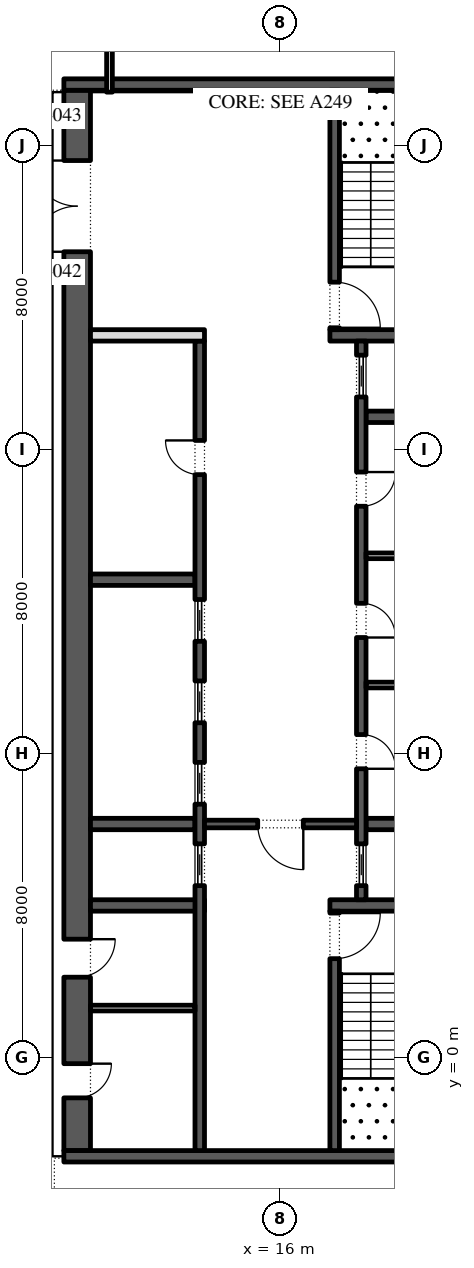
"""IFC4 building model, lengths in metres.
Left out: names, types, materials, properties, quantities, classifications, styles, units other than length and angle.
Written with IfcOpenShell. Run it as: python <this file> out.ifc"""

import sys

from ifc_helpers import new_model, si_unit, direction, frame, frame_2d, origin, place, context, subcontext, project, spatial, rectangle, extrude, element, fill, save


model = new_model("IFC4")
c1 = context("Model", 3, precision=1e-05, world=origin(), true_north=direction((0.0, 1.0)))
c2 = subcontext(c1, "Body", "Model", "MODEL_VIEW")
j1 = project(units=[si_unit("LENGTHUNIT", "METRE"), si_unit("PLANEANGLEUNIT", "RADIAN")], contexts=[c1])
p1 = place(None, origin())
s1 = spatial("IfcSite", under=j1, at=p1, CompositionType="ELEMENT")
p2 = place(p1, origin())
s2 = spatial("IfcBuilding", under=s1, at=p2, CompositionType="ELEMENT")
p3 = place(p2, frame((0.0, 0.0, 209.4)))
s3 = spatial("IfcBuildingStorey", under=s2, at=p3, CompositionType="ELEMENT", Elevation=209.4)
p4 = place(p3, frame((10.65, -2.45, 0.0), z_axis=(0.0, 0.0, 1.0), x_axis=(0.0, 1.0, 0.0)))
e1 = element("IfcWall", 1, at=p4, inside=s3, PredefinedType="SHEAR", context=c2, shape_type="SweptSolid", body=[
    extrude(rectangle(XDim=27.9, YDim=0.7, at=frame_2d((13.95, 0.0))), origin(), (0.0, 0.0, 1.0), 4.0),
])
p5 = place(p4, frame((23.65, 0.0, 0.0)))
e2 = element("IfcOpeningElement", 2, at=p5, cuts=e1, PredefinedType="OPENING", context=c2, shape_type="SweptSolid", body=[
    extrude(rectangle(XDim=2.4, YDim=2.1, at=frame_2d((1.2, 1.05))), frame((0.0, 0.36, 0.0), z_axis=(0.0, -1.0, 0.0), x_axis=(1.0, 0.0, 0.0)), (0.0, 0.0, 1.0), 0.72),
])
p6 = place(p4, frame((1.387, 0.0, 0.0)))
e3 = element("IfcOpeningElement", 3, at=p6, cuts=e1, PredefinedType="OPENING", context=c2, shape_type="SweptSolid", body=[
    extrude(rectangle(XDim=0.9, YDim=2.1, at=frame_2d((0.45, 1.05))), frame((0.0, 0.36, 0.0), z_axis=(0.0, -1.0, 0.0), x_axis=(1.0, 0.0, 0.0)), (0.0, 0.0, 1.0), 0.72),
])
p7 = place(p4, frame((4.562, 0.0, 0.0)))
e4 = element("IfcOpeningElement", 4, at=p7, cuts=e1, PredefinedType="OPENING", context=c2, shape_type="SweptSolid", body=[
    extrude(rectangle(XDim=1.0, YDim=2.1, at=frame_2d((0.5, 1.05))), frame((0.0, 0.36, 0.0), z_axis=(0.0, -1.0, 0.0), x_axis=(1.0, 0.0, 0.0)), (0.0, 0.0, 1.0), 0.72),
])
for number, where, z_axis, x_axis in (
    (5, (10.3, -2.6, 0.0), (0.0, 0.0, 1.0), (1.0, 0.0, 0.0)),
    (6, (10.3, 25.6, 0.0), (0.0, 0.0, 1.0), (1.0, 0.0, 0.0)),
):
    element("IfcWall", number, at=place(p3, frame(where, z_axis=z_axis, x_axis=x_axis)), inside=s3, PredefinedType="SHEAR", context=c2, shape_type="SweptSolid", body=[
        extrude(rectangle(XDim=11.4, YDim=0.3, at=frame_2d((5.7, 0.0))), origin(), (0.0, 0.0, 1.0), 4.0),
    ])
p8 = place(p3, frame((17.3, 4.0, 0.0), z_axis=(0.0, 0.0, 1.0), x_axis=(1.0, 0.0, 0.0)))
e7 = element("IfcWall", 7, at=p8, inside=s3, PredefinedType="SHEAR", context=c2, shape_type="SweptSolid", body=[
    extrude(rectangle(XDim=3.7, YDim=0.3, at=frame_2d((1.85, 0.0))), origin(), (0.0, 0.0, 1.0), 4.0),
])
p9 = place(p3, frame((17.425, -2.45, 0.0), z_axis=(0.0, 0.0, 1.0), x_axis=(0.0, 1.0, 0.0)))
e8 = element("IfcWall", 8, at=p9, inside=s3, PredefinedType="SHEAR", context=c2, shape_type="SweptSolid", body=[
    extrude(rectangle(XDim=6.3, YDim=0.25, at=frame_2d((3.15, 0.0))), origin(), (0.0, 0.0, 1.0), 4.0),
])
p10 = place(p9, frame((5.05, 0.0, 0.0)))
e9 = element("IfcOpeningElement", 9, at=p10, cuts=e8, PredefinedType="OPENING", context=c2, shape_type="SweptSolid", body=[
    extrude(rectangle(XDim=1.2, YDim=2.1, at=frame_2d((0.6, 1.05))), frame((0.0, 0.135, 0.0), z_axis=(0.0, -1.0, 0.0), x_axis=(1.0, 0.0, 0.0)), (0.0, 0.0, 1.0), 0.27),
])
p11 = place(p3, frame((17.3, 19.0, 0.0), z_axis=(0.0, 0.0, 1.0), x_axis=(1.0, 0.0, 0.0)))
e10 = element("IfcWall", 10, at=p11, inside=s3, PredefinedType="SHEAR", context=c2, shape_type="SweptSolid", body=[
    extrude(rectangle(XDim=3.7, YDim=0.3, at=frame_2d((1.85, 0.0))), origin(), (0.0, 0.0, 1.0), 4.0),
])
p12 = place(p3, frame((17.425, 19.15, 0.0), z_axis=(0.0, 0.0, 1.0), x_axis=(0.0, 1.0, 0.0)))
e11 = element("IfcWall", 11, at=p12, inside=s3, PredefinedType="SHEAR", context=c2, shape_type="SweptSolid", body=[
    extrude(rectangle(XDim=6.3, YDim=0.25, at=frame_2d((3.15, 0.0))), origin(), (0.0, 0.0, 1.0), 4.0),
])
p13 = place(p12, frame((0.05, 0.0, 0.0)))
e12 = element("IfcOpeningElement", 12, at=p13, cuts=e11, PredefinedType="OPENING", context=c2, shape_type="SweptSolid", body=[
    extrude(rectangle(XDim=1.2, YDim=2.1, at=frame_2d((0.6, 1.05))), frame((0.0, 0.135, 0.0), z_axis=(0.0, -1.0, 0.0), x_axis=(1.0, 0.0, 0.0)), (0.0, 0.0, 1.0), 0.27),
])
for number, where, z_axis, x_axis in (
    (13, (18.25, 6.143, 0.0), (0.0, 0.0, 1.0), (1.0, 0.0, 0.0)),
    (14, (18.25, 16.857, 0.0), (0.0, 0.0, 1.0), (1.0, 0.0, 0.0)),
):
    element("IfcWall", number, at=place(p3, frame(where, z_axis=z_axis, x_axis=x_axis)), inside=s3, PredefinedType="SHEAR", context=c2, shape_type="SweptSolid", body=[
        extrude(rectangle(XDim=2.75, YDim=0.3, at=frame_2d((1.375, 0.0))), origin(), (0.0, 0.0, 1.0), 4.0),
    ])
p14 = place(p3, frame((18.125, 4.15, 0.0), z_axis=(0.0, 0.0, 1.0), x_axis=(0.0, 1.0, 0.0)))
e15 = element("IfcWall", 15, at=p14, inside=s3, PredefinedType="SHEAR", context=c2, shape_type="SweptSolid", body=[
    extrude(rectangle(XDim=14.7, YDim=0.25, at=frame_2d((7.35, 0.0))), origin(), (0.0, 0.0, 1.0), 4.0),
])
p15 = place(p14, frame((3.446, 0.0, 0.0)))
e16 = element("IfcOpeningElement", 16, at=p15, cuts=e15, PredefinedType="OPENING", context=c2, shape_type="SweptSolid", body=[
    extrude(rectangle(XDim=0.9, YDim=2.1, at=frame_2d((0.45, 1.05))), frame((0.0, 0.135, 0.0), z_axis=(0.0, -1.0, 0.0), x_axis=(1.0, 0.0, 0.0)), (0.0, 0.0, 1.0), 0.27),
])
p16 = place(p14, frame((6.9, 0.0, 0.0)))
e17 = element("IfcOpeningElement", 17, at=p16, cuts=e15, PredefinedType="OPENING", context=c2, shape_type="SweptSolid", body=[
    extrude(rectangle(XDim=0.9, YDim=2.1, at=frame_2d((0.45, 1.05))), frame((0.0, 0.135, 0.0), z_axis=(0.0, -1.0, 0.0), x_axis=(1.0, 0.0, 0.0)), (0.0, 0.0, 1.0), 0.27),
])
p17 = place(p14, frame((10.354, 0.0, 0.0)))
e18 = element("IfcOpeningElement", 18, at=p17, cuts=e15, PredefinedType="OPENING", context=c2, shape_type="SweptSolid", body=[
    extrude(rectangle(XDim=0.9, YDim=2.1, at=frame_2d((0.45, 1.05))), frame((0.0, 0.135, 0.0), z_axis=(0.0, -1.0, 0.0), x_axis=(1.0, 0.0, 0.0)), (0.0, 0.0, 1.0), 0.27),
])
p18 = place(p14, frame((0.371, 0.0, 0.0)))
e19 = element("IfcOpeningElement", 19, at=p18, cuts=e15, PredefinedType="OPENING", context=c2, shape_type="SweptSolid", body=[
    extrude(rectangle(XDim=1.1, YDim=2.1, at=frame_2d((0.55, 1.05))), frame((0.0, 0.135, 0.0), z_axis=(0.0, -1.0, 0.0), x_axis=(1.0, 0.0, 0.0)), (0.0, 0.0, 1.0), 0.27),
])
p19 = place(p14, frame((13.229, 0.0, 0.0)))
e20 = element("IfcOpeningElement", 20, at=p19, cuts=e15, PredefinedType="OPENING", context=c2, shape_type="SweptSolid", body=[
    extrude(rectangle(XDim=1.1, YDim=2.1, at=frame_2d((0.55, 1.05))), frame((0.0, 0.135, 0.0), z_axis=(0.0, -1.0, 0.0), x_axis=(1.0, 0.0, 0.0)), (0.0, 0.0, 1.0), 0.27),
])
for number, where, z_axis, x_axis in (
    (21, (18.25, 9.8, 0.0), (0.0, 0.0, 1.0), (1.0, 0.0, 0.0)),
    (22, (18.25, 13.2, 0.0), (0.0, 0.0, 1.0), (1.0, 0.0, 0.0)),
):
    element("IfcWall", number, at=place(p3, frame(where, z_axis=z_axis, x_axis=x_axis)), inside=s3, PredefinedType="PARTITIONING", context=c2, shape_type="SweptSolid", body=[
        extrude(rectangle(XDim=2.75, YDim=0.15, at=frame_2d((1.375, 0.0))), origin(), (0.0, 0.0, 1.0), 4.0),
    ])
p20 = place(p3, frame((11.0, 4.0, 0.0), z_axis=(0.0, 0.0, 1.0), x_axis=(1.0, 0.0, 0.0)))
e23 = element("IfcWall", 23, at=p20, inside=s3, PredefinedType="SHEAR", context=c2, shape_type="SweptSolid", body=[
    extrude(rectangle(XDim=3.0, YDim=0.3, at=frame_2d((1.5, 0.0))), origin(), (0.0, 0.0, 1.0), 4.0),
])
for number, where, z_axis, x_axis in (
    (24, (11.0, 6.143, 0.0), (0.0, 0.0, 1.0), (1.0, 0.0, 0.0)),
    (25, (11.0, 12.571, 0.0), (0.0, 0.0, 1.0), (1.0, 0.0, 0.0)),
):
    element("IfcWall", number, at=place(p3, frame(where, z_axis=z_axis, x_axis=x_axis)), inside=s3, PredefinedType="SHEAR", context=c2, shape_type="SweptSolid", body=[
        extrude(rectangle(XDim=2.75, YDim=0.3, at=frame_2d((1.375, 0.0))), origin(), (0.0, 0.0, 1.0), 4.0),
    ])
p21 = place(p3, frame((13.875, -2.45, 0.0), z_axis=(0.0, 0.0, 1.0), x_axis=(0.0, 1.0, 0.0)))
e26 = element("IfcWall", 26, at=p21, inside=s3, PredefinedType="SHEAR", context=c2, shape_type="SweptSolid", body=[
    extrude(rectangle(XDim=21.3, YDim=0.25, at=frame_2d((10.65, 0.0))), origin(), (0.0, 0.0, 1.0), 4.0),
])
p22 = place(p21, frame((17.786, 0.0, 0.0)))
e27 = element("IfcOpeningElement", 27, at=p22, cuts=e26, PredefinedType="OPENING", context=c2, shape_type="SweptSolid", body=[
    extrude(rectangle(XDim=0.9, YDim=2.1, at=frame_2d((0.45, 1.05))), frame((0.0, 0.135, 0.0), z_axis=(0.0, -1.0, 0.0), x_axis=(1.0, 0.0, 0.0)), (0.0, 0.0, 1.0), 0.27),
])
p23 = place(p21, frame((6.971, 0.0, 0.0)))
e28 = element("IfcOpeningElement", 28, at=p23, cuts=e26, PredefinedType="OPENING", context=c2, shape_type="SweptSolid", body=[
    extrude(rectangle(XDim=1.1, YDim=2.1, at=frame_2d((0.55, 1.05))), frame((0.0, 0.135, 0.0), z_axis=(0.0, -1.0, 0.0), x_axis=(1.0, 0.0, 0.0)), (0.0, 0.0, 1.0), 0.27),
])
p24 = place(p21, frame((9.114, 0.0, 0.0)))
e29 = element("IfcOpeningElement", 29, at=p24, cuts=e26, PredefinedType="OPENING", context=c2, shape_type="SweptSolid", body=[
    extrude(rectangle(XDim=1.1, YDim=2.1, at=frame_2d((0.55, 1.05))), frame((0.0, 0.135, 0.0), z_axis=(0.0, -1.0, 0.0), x_axis=(1.0, 0.0, 0.0)), (0.0, 0.0, 1.0), 0.27),
])
p25 = place(p21, frame((11.257, 0.0, 0.0)))
e30 = element("IfcOpeningElement", 30, at=p25, cuts=e26, PredefinedType="OPENING", context=c2, shape_type="SweptSolid", body=[
    extrude(rectangle(XDim=1.1, YDim=2.1, at=frame_2d((0.55, 1.05))), frame((0.0, 0.135, 0.0), z_axis=(0.0, -1.0, 0.0), x_axis=(1.0, 0.0, 0.0)), (0.0, 0.0, 1.0), 0.27),
])
p26 = place(p21, frame((13.4, 0.0, 0.0)))
e31 = element("IfcOpeningElement", 31, at=p26, cuts=e26, PredefinedType="OPENING", context=c2, shape_type="SweptSolid", body=[
    extrude(rectangle(XDim=1.1, YDim=2.1, at=frame_2d((0.55, 1.05))), frame((0.0, 0.135, 0.0), z_axis=(0.0, -1.0, 0.0), x_axis=(1.0, 0.0, 0.0)), (0.0, 0.0, 1.0), 0.27),
])
p27 = place(p3, frame((11.0, 19.0, 0.0), z_axis=(0.0, 0.0, 1.0), x_axis=(1.0, 0.0, 0.0)))
e32 = element("IfcWall", 32, at=p27, inside=s3, PredefinedType="PARTITIONING", context=c2, shape_type="SweptSolid", body=[
    extrude(rectangle(XDim=3.0, YDim=0.3, at=frame_2d((1.5, 0.0))), origin(), (0.0, 0.0, 1.0), 4.0),
])
p28 = place(p3, frame((14.0, 6.143, 0.0), z_axis=(0.0, 0.0, 1.0), x_axis=(1.0, 0.0, 0.0)))
e33 = element("IfcWall", 33, at=p28, inside=s3, PredefinedType="SHEAR", context=c2, shape_type="SweptSolid", body=[
    extrude(rectangle(XDim=4.0, YDim=0.2, at=frame_2d((2.0, 0.0))), origin(), (0.0, 0.0, 1.0), 4.0),
])
p29 = place(p28, frame((1.4, 0.0, 0.0)))
e34 = element("IfcOpeningElement", 34, at=p29, cuts=e33, PredefinedType="OPENING", context=c2, shape_type="SweptSolid", body=[
    extrude(rectangle(XDim=1.2, YDim=2.1, at=frame_2d((0.6, 1.05))), frame((0.0, 0.11, 0.0), z_axis=(0.0, -1.0, 0.0), x_axis=(1.0, 0.0, 0.0)), (0.0, 0.0, 1.0), 0.22),
])
p30 = place(p3, frame((11.0, 1.3, 0.0), z_axis=(0.0, 0.0, 1.0), x_axis=(1.0, 0.0, 0.0)))
e35 = element("IfcWall", 35, at=p30, inside=s3, PredefinedType="PARTITIONING", context=c2, shape_type="SweptSolid", body=[
    extrude(rectangle(XDim=2.75, YDim=0.15, at=frame_2d((1.375, 0.0))), origin(), (0.0, 0.0, 1.0), 4.0),
])
p31 = place(p3, frame((11.5, 29.165, 0.0), z_axis=(0.0, 0.0, 1.0), x_axis=(0.0, -1.0, 0.0)))
e36 = element("IfcWall", 36, at=p31, inside=s3, PredefinedType="PARTITIONING", context=c2, shape_type="SweptSolid", body=[
    extrude(rectangle(XDim=3.765, YDim=0.15, at=frame_2d((1.883, 0.0))), origin(), (0.0, 0.0, 1.0), 4.0),
])
p32 = place(p31, frame((0.615, 0.0, 0.0)))
e37 = element("IfcOpeningElement", 37, at=p32, cuts=e36, PredefinedType="OPENING", context=c2, shape_type="SweptSolid", body=[
    extrude(rectangle(XDim=1.0, YDim=2.1, at=frame_2d((0.5, 1.05))), frame((0.0, 0.085, 0.0), z_axis=(0.0, -1.0, 0.0), x_axis=(1.0, 0.0, 0.0)), (0.0, 0.0, 1.0), 0.17),
])
p33 = place(p15, frame((0.9, -0.2, 0.0), z_axis=(0.0, 0.0, 1.0), x_axis=(-1.0, 0.0, 0.0)))
e38 = element("IfcDoor", 38, at=p33, inside=s3, OperationType="SINGLE_SWING_LEFT", PredefinedType="DOOR", context=c2, shape_type="SweptSolid", body=[
    extrude(rectangle(XDim=0.9, YDim=2.1, at=frame_2d((0.45, 1.05))), frame((0.0, -0.075, 0.0), z_axis=(0.0, -1.0, 0.0), x_axis=(1.0, 0.0, 0.0)), (0.0, 0.0, 1.0), 0.05),
])
fill(e16, e38)
p34 = place(p16, frame((0.9, -0.2, 0.0), z_axis=(0.0, 0.0, 1.0), x_axis=(-1.0, 0.0, 0.0)))
e39 = element("IfcDoor", 39, at=p34, inside=s3, OperationType="SINGLE_SWING_LEFT", PredefinedType="DOOR", context=c2, shape_type="SweptSolid", body=[
    extrude(rectangle(XDim=0.9, YDim=2.1, at=frame_2d((0.45, 1.05))), frame((0.0, -0.075, 0.0), z_axis=(0.0, -1.0, 0.0), x_axis=(1.0, 0.0, 0.0)), (0.0, 0.0, 1.0), 0.05),
])
fill(e17, e39)
p35 = place(p17, frame((0.9, -0.2, 0.0), z_axis=(0.0, 0.0, 1.0), x_axis=(-1.0, 0.0, 0.0)))
e40 = element("IfcDoor", 40, at=p35, inside=s3, OperationType="SINGLE_SWING_RIGHT", PredefinedType="DOOR", context=c2, shape_type="SweptSolid", body=[
    extrude(rectangle(XDim=0.9, YDim=2.1, at=frame_2d((0.45, 1.05))), frame((0.0, -0.075, 0.0), z_axis=(0.0, -1.0, 0.0), x_axis=(1.0, 0.0, 0.0)), (0.0, 0.0, 1.0), 0.05),
])
fill(e18, e40)
p36 = place(p18, origin())
e41 = element("IfcDoor", 41, at=p36, inside=s3, OperationType="SLIDING_TO_LEFT", PredefinedType="DOOR", context=c2, shape_type="SweptSolid", body=[
    extrude(rectangle(XDim=1.1, YDim=2.1, at=frame_2d((0.55, 1.05))), frame((0.0, 0.025, 0.0), z_axis=(0.0, -1.0, 0.0), x_axis=(1.0, 0.0, 0.0)), (0.0, 0.0, 1.0), 0.05),
])
fill(e19, e41)
p37 = place(p19, origin())
e42 = element("IfcDoor", 42, at=p37, inside=s3, OperationType="SLIDING_TO_LEFT", PredefinedType="DOOR", context=c2, shape_type="SweptSolid", body=[
    extrude(rectangle(XDim=1.1, YDim=2.1, at=frame_2d((0.55, 1.05))), frame((0.0, 0.025, 0.0), z_axis=(0.0, -1.0, 0.0), x_axis=(1.0, 0.0, 0.0)), (0.0, 0.0, 1.0), 0.05),
])
fill(e20, e42)
p38 = place(p22, origin())
e43 = element("IfcDoor", 43, at=p38, inside=s3, OperationType="SINGLE_SWING_LEFT", PredefinedType="DOOR", context=c2, shape_type="SweptSolid", body=[
    extrude(rectangle(XDim=0.9, YDim=2.1, at=frame_2d((0.45, 1.05))), frame((0.0, 0.125, 0.0), z_axis=(0.0, -1.0, 0.0), x_axis=(1.0, 0.0, 0.0)), (0.0, 0.0, 1.0), 0.05),
])
fill(e27, e43)
p39 = place(p23, origin())
e44 = element("IfcDoor", 44, at=p39, inside=s3, OperationType="SLIDING_TO_LEFT", PredefinedType="DOOR", context=c2, shape_type="SweptSolid", body=[
    extrude(rectangle(XDim=1.1, YDim=2.1, at=frame_2d((0.55, 1.05))), frame((0.0, 0.025, 0.0), z_axis=(0.0, -1.0, 0.0), x_axis=(1.0, 0.0, 0.0)), (0.0, 0.0, 1.0), 0.05),
])
fill(e28, e44)
p40 = place(p24, origin())
e45 = element("IfcDoor", 45, at=p40, inside=s3, OperationType="SLIDING_TO_LEFT", PredefinedType="DOOR", context=c2, shape_type="SweptSolid", body=[
    extrude(rectangle(XDim=1.1, YDim=2.1, at=frame_2d((0.55, 1.05))), frame((0.0, 0.025, 0.0), z_axis=(0.0, -1.0, 0.0), x_axis=(1.0, 0.0, 0.0)), (0.0, 0.0, 1.0), 0.05),
])
fill(e29, e45)
p41 = place(p25, origin())
e46 = element("IfcDoor", 46, at=p41, inside=s3, OperationType="SLIDING_TO_LEFT", PredefinedType="DOOR", context=c2, shape_type="SweptSolid", body=[
    extrude(rectangle(XDim=1.1, YDim=2.1, at=frame_2d((0.55, 1.05))), frame((0.0, 0.025, 0.0), z_axis=(0.0, -1.0, 0.0), x_axis=(1.0, 0.0, 0.0)), (0.0, 0.0, 1.0), 0.05),
])
fill(e30, e46)
p42 = place(p26, origin())
e47 = element("IfcDoor", 47, at=p42, inside=s3, OperationType="SLIDING_TO_LEFT", PredefinedType="DOOR", context=c2, shape_type="SweptSolid", body=[
    extrude(rectangle(XDim=1.1, YDim=2.1, at=frame_2d((0.55, 1.05))), frame((0.0, 0.025, 0.0), z_axis=(0.0, -1.0, 0.0), x_axis=(1.0, 0.0, 0.0)), (0.0, 0.0, 1.0), 0.05),
])
fill(e31, e47)
p43 = place(p29, frame((1.2, 0.0, 0.0), z_axis=(0.0, 0.0, 1.0), x_axis=(-1.0, 0.0, 0.0)))
e48 = element("IfcDoor", 48, at=p43, inside=s3, OperationType="SINGLE_SWING_RIGHT", PredefinedType="DOOR", context=c2, shape_type="SweptSolid", body=[
    extrude(rectangle(XDim=1.2, YDim=2.1, at=frame_2d((0.6, 1.05))), frame((0.0, 0.025, 0.0), z_axis=(0.0, -1.0, 0.0), x_axis=(1.0, 0.0, 0.0)), (0.0, 0.0, 1.0), 0.05),
])
fill(e34, e48)
p44 = place(p5, origin())
e49 = element("IfcDoor", 49, at=p44, inside=s3, OperationType="DOUBLE_DOOR_SINGLE_SWING", PredefinedType="DOOR", context=c2, shape_type="SweptSolid", body=[
    extrude(rectangle(XDim=2.4, YDim=2.1, at=frame_2d((1.2, 1.05))), frame((0.0, 0.025, 0.0), z_axis=(0.0, -1.0, 0.0), x_axis=(1.0, 0.0, 0.0)), (0.0, 0.0, 1.0), 0.05),
])
fill(e2, e49)
p45 = place(p10, frame((1.2, 0.0, 0.0), z_axis=(0.0, 0.0, 1.0), x_axis=(-1.0, 0.0, 0.0)))
e50 = element("IfcDoor", 50, at=p45, inside=s3, OperationType="SINGLE_SWING_RIGHT", PredefinedType="DOOR", context=c2, shape_type="SweptSolid", body=[
    extrude(rectangle(XDim=1.2, YDim=2.1, at=frame_2d((0.6, 1.05))), frame((0.0, 0.025, 0.0), z_axis=(0.0, -1.0, 0.0), x_axis=(1.0, 0.0, 0.0)), (0.0, 0.0, 1.0), 0.05),
])
fill(e9, e50)
p46 = place(p13, frame((1.2, 0.0, 0.0), z_axis=(0.0, 0.0, 1.0), x_axis=(-1.0, 0.0, 0.0)))
e51 = element("IfcDoor", 51, at=p46, inside=s3, OperationType="SINGLE_SWING_LEFT", PredefinedType="DOOR", context=c2, shape_type="SweptSolid", body=[
    extrude(rectangle(XDim=1.2, YDim=2.1, at=frame_2d((0.6, 1.05))), frame((0.0, 0.025, 0.0), z_axis=(0.0, -1.0, 0.0), x_axis=(1.0, 0.0, 0.0)), (0.0, 0.0, 1.0), 0.05),
])
fill(e12, e51)
p47 = place(p6, frame((0.9, -0.65, 0.0), z_axis=(0.0, 0.0, 1.0), x_axis=(-1.0, 0.0, 0.0)))
e52 = element("IfcDoor", 52, at=p47, inside=s3, OperationType="SINGLE_SWING_RIGHT", PredefinedType="DOOR", context=c2, shape_type="SweptSolid", body=[
    extrude(rectangle(XDim=0.9, YDim=2.1, at=frame_2d((0.45, 1.05))), frame((0.0, -0.3, 0.0), z_axis=(0.0, -1.0, 0.0), x_axis=(1.0, 0.0, 0.0)), (0.0, 0.0, 1.0), 0.05),
])
fill(e3, e52)
p48 = place(p7, frame((1.0, -0.65, 0.0), z_axis=(0.0, 0.0, 1.0), x_axis=(-1.0, 0.0, 0.0)))
e53 = element("IfcDoor", 53, at=p48, inside=s3, OperationType="SINGLE_SWING_RIGHT", PredefinedType="DOOR", context=c2, shape_type="SweptSolid", body=[
    extrude(rectangle(XDim=1.0, YDim=2.1, at=frame_2d((0.5, 1.05))), frame((0.0, -0.3, 0.0), z_axis=(0.0, -1.0, 0.0), x_axis=(1.0, 0.0, 0.0)), (0.0, 0.0, 1.0), 0.05),
])
fill(e4, e53)
save(model, sys.argv[1])
